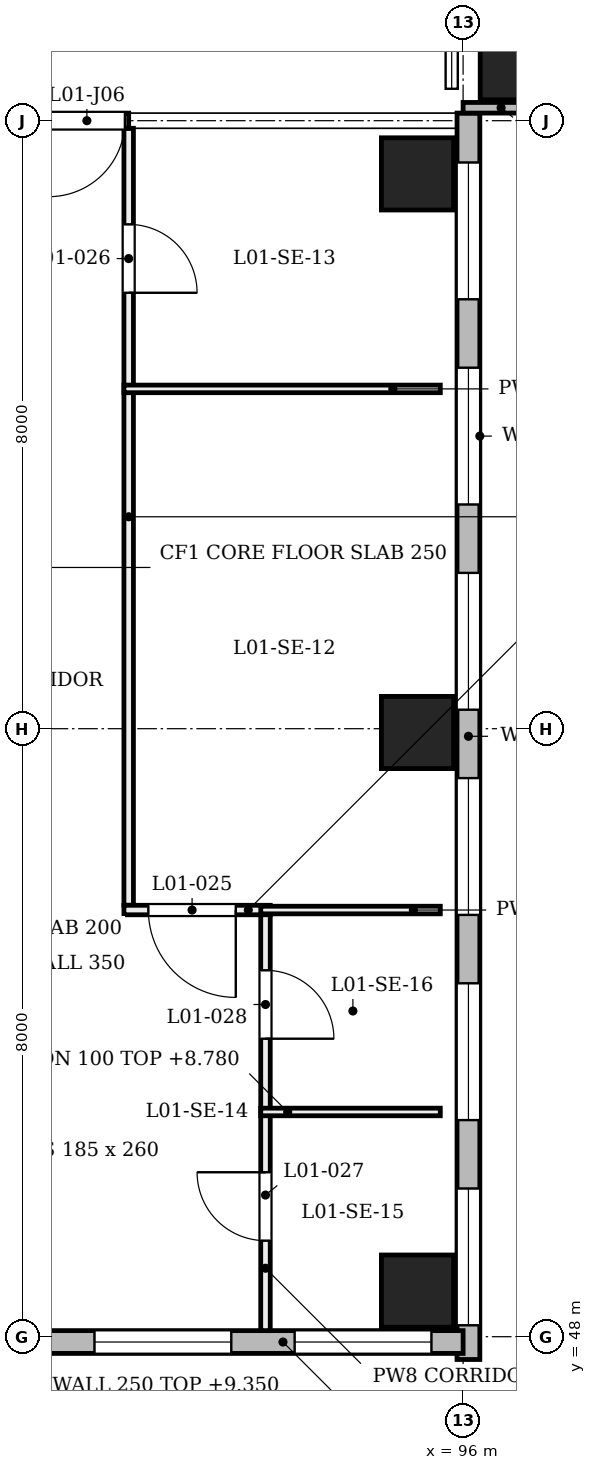
"""IFC4 building model, lengths in metres.
Left out: names, types, materials, properties, quantities, classifications, styles, units other than length and angle.
Written with IfcOpenShell. Run it as: python <this file> out.ifc"""

import sys

from ifc_helpers import new_model, si_unit, direction, frame, frame_2d, origin, origin_2d, place, context, subcontext, project, spatial, rectangle, extrude, element, fill, save


model = new_model("IFC4")
c1 = context("Model", 3, precision=1e-05, world=origin(), true_north=direction((0.0, 1.0)))
c2 = subcontext(c1, "Body", "Model", "MODEL_VIEW")
j1 = project(units=[si_unit("LENGTHUNIT", "METRE"), si_unit("PLANEANGLEUNIT", "RADIAN")], contexts=[c1])
p1 = place(None, origin())
s1 = spatial("IfcSite", under=j1, at=p1, CompositionType="ELEMENT")
p2 = place(p1, origin())
s2 = spatial("IfcBuilding", under=s1, at=p2, CompositionType="ELEMENT")
p3 = place(p2, frame((0.0, 0.0, 4.8)))
s3 = spatial("IfcBuildingStorey", under=s2, at=p3, CompositionType="ELEMENT", Elevation=4.8)
for number, where, z_axis, x_axis in (
    (1, (95.4, 48.6, 0.0), (0.0, 0.0, 1.0), (1.0, 0.0, 0.0)),
    (2, (95.4, 55.95, 0.0), (0.0, 0.0, 1.0), (1.0, 0.0, 0.0)),
    (3, (95.4, 63.3, 0.0), (0.0, 0.0, 1.0), (1.0, 0.0, 0.0)),
):
    element("IfcColumn", number, at=place(p3, frame(where, z_axis=z_axis, x_axis=x_axis)), inside=s3, PredefinedType="COLUMN", context=c2, shape_type="SweptSolid", body=[
        extrude(rectangle(XDim=0.95, YDim=0.95, at=origin_2d()), origin(), (0.0, 0.0, 1.0), 4.8),
    ])
p4 = place(p3, frame((96.4, 64.7, 0.0), z_axis=(0.203952265704, 0.0, 0.978980833987), x_axis=(0.0, 1.0, 0.0)))
e4 = element("IfcColumn", 4, at=p4, inside=s3, PredefinedType="COLUMN", context=c2, shape_type="SweptSolid", body=[
    extrude(rectangle(XDim=0.85, YDim=0.85, at=origin_2d()), origin(), (0.0, 0.0, 1.0), 4.903),
])
p5 = place(p3, frame((96.07, 47.7, 0.0), z_axis=(0.0, 0.0, 1.0), x_axis=(0.0, 1.0, 0.0)))
e5 = element("IfcWall", 5, at=p5, inside=s3, PredefinedType="SOLIDWALL", context=c2, shape_type="SweptSolid", body=[
    extrude(rectangle(XDim=16.4, YDim=0.3, at=frame_2d((8.2, 0.0))), origin(), (0.0, 0.0, 1.0), 3.9),
])
p6 = place(p5, frame((0.45, 0.0, 0.75)))
e6 = element("IfcOpeningElement", 6, at=p6, cuts=e5, PredefinedType="OPENING", context=c2, shape_type="SweptSolid", body=[
    extrude(rectangle(XDim=1.8, YDim=3.1, at=frame_2d((0.9, 1.55))), frame((0.0, 0.16, 0.0), z_axis=(0.0, -1.0, 0.0), x_axis=(1.0, 0.0, 0.0)), (0.0, 0.0, 1.0), 0.32),
])
p7 = place(p5, frame((3.15, 0.0, 0.75)))
e7 = element("IfcOpeningElement", 7, at=p7, cuts=e5, PredefinedType="OPENING", context=c2, shape_type="SweptSolid", body=[
    extrude(rectangle(XDim=1.8, YDim=3.1, at=frame_2d((0.9, 1.55))), frame((0.0, 0.16, 0.0), z_axis=(0.0, -1.0, 0.0), x_axis=(1.0, 0.0, 0.0)), (0.0, 0.0, 1.0), 0.32),
])
p8 = place(p5, frame((5.85, 0.0, 0.75)))
e8 = element("IfcOpeningElement", 8, at=p8, cuts=e5, PredefinedType="OPENING", context=c2, shape_type="SweptSolid", body=[
    extrude(rectangle(XDim=1.8, YDim=3.1, at=frame_2d((0.9, 1.55))), frame((0.0, 0.16, 0.0), z_axis=(0.0, -1.0, 0.0), x_axis=(1.0, 0.0, 0.0)), (0.0, 0.0, 1.0), 0.32),
])
p9 = place(p5, frame((8.55, 0.0, 0.75)))
e9 = element("IfcOpeningElement", 9, at=p9, cuts=e5, PredefinedType="OPENING", context=c2, shape_type="SweptSolid", body=[
    extrude(rectangle(XDim=1.8, YDim=3.1, at=frame_2d((0.9, 1.55))), frame((0.0, 0.16, 0.0), z_axis=(0.0, -1.0, 0.0), x_axis=(1.0, 0.0, 0.0)), (0.0, 0.0, 1.0), 0.32),
])
p10 = place(p5, frame((11.25, 0.0, 0.75)))
e10 = element("IfcOpeningElement", 10, at=p10, cuts=e5, PredefinedType="OPENING", context=c2, shape_type="SweptSolid", body=[
    extrude(rectangle(XDim=1.8, YDim=3.1, at=frame_2d((0.9, 1.55))), frame((0.0, 0.16, 0.0), z_axis=(0.0, -1.0, 0.0), x_axis=(1.0, 0.0, 0.0)), (0.0, 0.0, 1.0), 0.32),
])
p11 = place(p5, frame((13.95, 0.0, 0.75)))
e11 = element("IfcOpeningElement", 11, at=p11, cuts=e5, PredefinedType="OPENING", context=c2, shape_type="SweptSolid", body=[
    extrude(rectangle(XDim=1.8, YDim=3.1, at=frame_2d((0.9, 1.55))), frame((0.0, 0.16, 0.0), z_axis=(0.0, -1.0, 0.0), x_axis=(1.0, 0.0, 0.0)), (0.0, 0.0, 1.0), 0.32),
])
p12 = place(p3, frame((88.1, 47.93, 0.0), z_axis=(0.0, 0.0, 1.0), x_axis=(1.0, 0.0, 0.0)))
e12 = element("IfcWall", 12, at=p12, inside=s3, PredefinedType="SOLIDWALL", context=c2, shape_type="SweptSolid", body=[
    extrude(rectangle(XDim=7.9, YDim=0.3, at=frame_2d((3.95, 0.0))), origin(), (0.0, 0.0, 1.0), 3.9),
])
p13 = place(p12, frame((0.417, 0.0, 0.75)))
e13 = element("IfcOpeningElement", 13, at=p13, cuts=e12, PredefinedType="OPENING", context=c2, shape_type="SweptSolid", body=[
    extrude(rectangle(XDim=1.8, YDim=3.1, at=frame_2d((0.9, 1.55))), frame((0.0, 0.16, 0.0), z_axis=(0.0, -1.0, 0.0), x_axis=(1.0, 0.0, 0.0)), (0.0, 0.0, 1.0), 0.32),
])
p14 = place(p12, frame((3.05, 0.0, 0.75)))
e14 = element("IfcOpeningElement", 14, at=p14, cuts=e12, PredefinedType="OPENING", context=c2, shape_type="SweptSolid", body=[
    extrude(rectangle(XDim=1.8, YDim=3.1, at=frame_2d((0.9, 1.55))), frame((0.0, 0.16, 0.0), z_axis=(0.0, -1.0, 0.0), x_axis=(1.0, 0.0, 0.0)), (0.0, 0.0, 1.0), 0.32),
])
p15 = place(p12, frame((5.683, 0.0, 0.75)))
e15 = element("IfcOpeningElement", 15, at=p15, cuts=e12, PredefinedType="OPENING", context=c2, shape_type="SweptSolid", body=[
    extrude(rectangle(XDim=1.8, YDim=3.1, at=frame_2d((0.9, 1.55))), frame((0.0, 0.16, 0.0), z_axis=(0.0, -1.0, 0.0), x_axis=(1.0, 0.0, 0.0)), (0.0, 0.0, 1.0), 0.32),
])
p16 = place(p3, frame((96.0, 64.17, 0.0), z_axis=(0.0, 0.0, 1.0), x_axis=(1.0, 0.0, 0.0)))
e16 = element("IfcWall", 16, at=p16, inside=s3, PredefinedType="SOLIDWALL", context=c2, shape_type="SweptSolid", body=[
    extrude(rectangle(XDim=1.0, YDim=0.14, at=frame_2d((0.5, 0.0))), origin(), (0.0, 0.0, 1.0), 3.9),
])
p17 = place(p3, frame((91.6, 53.677, 0.0), z_axis=(0.0, 0.0, 1.0), x_axis=(0.0, 1.0, 0.0)))
e17 = element("IfcWall", 17, at=p17, inside=s3, PredefinedType="PARTITIONING", context=c2, shape_type="SweptSolid", body=[
    extrude(rectangle(XDim=10.223, YDim=0.125, at=frame_2d((5.112, 0.0))), origin(), (0.0, 0.0, 1.0), 3.88),
])
p18 = place(p17, frame((8.059, 0.0, 0.0)))
e18 = element("IfcOpeningElement", 18, at=p18, cuts=e17, PredefinedType="OPENING", context=c2, shape_type="SweptSolid", body=[
    extrude(rectangle(XDim=0.9, YDim=2.1, at=frame_2d((0.45, 1.05))), frame((0.0, 0.073, 0.0), z_axis=(0.0, -1.0, 0.0), x_axis=(1.0, 0.0, 0.0)), (0.0, 0.0, 1.0), 0.145),
])
p19 = place(p3, frame((91.538, 53.614, 0.0), z_axis=(0.0, 0.0, 1.0), x_axis=(1.0, 0.0, 0.0)))
e19 = element("IfcWall", 19, at=p19, inside=s3, PredefinedType="PARTITIONING", context=c2, shape_type="SweptSolid", body=[
    extrude(rectangle(XDim=1.925, YDim=0.125, at=frame_2d((0.962, 0.0))), origin(), (0.0, 0.0, 1.0), 4.56),
])
p20 = place(p19, frame((0.322, 0.0, 0.0)))
e20 = element("IfcOpeningElement", 20, at=p20, cuts=e19, PredefinedType="OPENING", context=c2, shape_type="SweptSolid", body=[
    extrude(rectangle(XDim=1.15, YDim=2.1, at=frame_2d((0.575, 1.05))), frame((0.0, 0.073, 0.0), z_axis=(0.0, -1.0, 0.0), x_axis=(1.0, 0.0, 0.0)), (0.0, 0.0, 1.0), 0.145),
])
p21 = place(p3, frame((93.337, 53.614, 0.0), z_axis=(0.0, 0.0, 1.0), x_axis=(1.0, 0.0, 0.0)))
e21 = element("IfcWall", 21, at=p21, inside=s3, PredefinedType="PARTITIONING", context=c2, shape_type="SweptSolid", body=[
    extrude(rectangle(XDim=2.363, YDim=0.1, at=frame_2d((1.181, 0.0))), origin(), (0.0, 0.0, 1.0), 3.98),
])
p22 = place(p3, frame((91.538, 60.471, 0.0), z_axis=(0.0, 0.0, 1.0), x_axis=(1.0, 0.0, 0.0)))
e22 = element("IfcWall", 22, at=p22, inside=s3, PredefinedType="PARTITIONING", context=c2, shape_type="SweptSolid", body=[
    extrude(rectangle(XDim=4.162, YDim=0.1, at=frame_2d((2.081, 0.0))), origin(), (0.0, 0.0, 1.0), 3.98),
])
p23 = place(p3, frame((93.4, 48.08, 0.0), z_axis=(0.0, 0.0, 1.0), x_axis=(0.0, 1.0, 0.0)))
e23 = element("IfcWall", 23, at=p23, inside=s3, PredefinedType="PARTITIONING", context=c2, shape_type="SweptSolid", body=[
    extrude(rectangle(XDim=5.472, YDim=0.125, at=frame_2d((2.736, 0.0))), origin(), (0.0, 0.0, 1.0), 3.88),
])
p24 = place(p23, frame((1.184, 0.0, 0.0)))
e24 = element("IfcOpeningElement", 24, at=p24, cuts=e23, PredefinedType="OPENING", context=c2, shape_type="SweptSolid", body=[
    extrude(rectangle(XDim=0.9, YDim=2.1, at=frame_2d((0.45, 1.05))), frame((0.0, 0.073, 0.0), z_axis=(0.0, -1.0, 0.0), x_axis=(1.0, 0.0, 0.0)), (0.0, 0.0, 1.0), 0.145),
])
p25 = place(p23, frame((3.841, 0.0, 0.0)))
e25 = element("IfcOpeningElement", 25, at=p25, cuts=e23, PredefinedType="OPENING", context=c2, shape_type="SweptSolid", body=[
    extrude(rectangle(XDim=0.9, YDim=2.1, at=frame_2d((0.45, 1.05))), frame((0.0, 0.073, 0.0), z_axis=(0.0, -1.0, 0.0), x_axis=(1.0, 0.0, 0.0)), (0.0, 0.0, 1.0), 0.145),
])
p26 = place(p3, frame((93.337, 50.957, 0.0), z_axis=(0.0, 0.0, 1.0), x_axis=(1.0, 0.0, 0.0)))
e26 = element("IfcWall", 26, at=p26, inside=s3, PredefinedType="PARTITIONING", context=c2, shape_type="SweptSolid", body=[
    extrude(rectangle(XDim=2.363, YDim=0.1, at=frame_2d((1.181, 0.0))), origin(), (0.0, 0.0, 1.0), 3.98),
])
p27 = place(p3, frame((88.0, 64.0, 0.0), z_axis=(0.0, 0.0, 1.0), x_axis=(1.0, 0.0, 0.0)))
e27 = element("IfcWall", 27, at=p27, inside=s3, PredefinedType="PARTITIONING", context=c2, shape_type="SweptSolid", body=[
    extrude(rectangle(XDim=3.6, YDim=0.2, at=frame_2d((1.8, 0.0))), origin(), (0.0, 0.0, 1.0), 3.88),
])
p28 = place(p27, frame((2.55, 0.0, 0.0)))
e28 = element("IfcOpeningElement", 28, at=p28, cuts=e27, PredefinedType="OPENING", context=c2, shape_type="SweptSolid", body=[
    extrude(rectangle(XDim=1.0, YDim=2.1, at=frame_2d((0.5, 1.05))), frame((0.0, 0.11, 0.0), z_axis=(0.0, -1.0, 0.0), x_axis=(1.0, 0.0, 0.0)), (0.0, 0.0, 1.0), 0.22),
])
p29 = place(p6, origin())
e29 = element("IfcWindow", 29, at=p29, inside=s3, PartitioningType="SINGLE_PANEL", PredefinedType="WINDOW", context=c2, shape_type="SweptSolid", body=[
    extrude(rectangle(XDim=1.8, YDim=3.1, at=frame_2d((0.9, 1.55))), frame((0.0, 0.03, 0.0), z_axis=(0.0, -1.0, 0.0), x_axis=(1.0, 0.0, 0.0)), (0.0, 0.0, 1.0), 0.06),
])
fill(e6, e29)
p30 = place(p7, origin())
e30 = element("IfcWindow", 30, at=p30, inside=s3, PartitioningType="SINGLE_PANEL", PredefinedType="WINDOW", context=c2, shape_type="SweptSolid", body=[
    extrude(rectangle(XDim=1.8, YDim=3.1, at=frame_2d((0.9, 1.55))), frame((0.0, 0.03, 0.0), z_axis=(0.0, -1.0, 0.0), x_axis=(1.0, 0.0, 0.0)), (0.0, 0.0, 1.0), 0.06),
])
fill(e7, e30)
p31 = place(p8, origin())
e31 = element("IfcWindow", 31, at=p31, inside=s3, PartitioningType="SINGLE_PANEL", PredefinedType="WINDOW", context=c2, shape_type="SweptSolid", body=[
    extrude(rectangle(XDim=1.8, YDim=3.1, at=frame_2d((0.9, 1.55))), frame((0.0, 0.03, 0.0), z_axis=(0.0, -1.0, 0.0), x_axis=(1.0, 0.0, 0.0)), (0.0, 0.0, 1.0), 0.06),
])
fill(e8, e31)
p32 = place(p9, origin())
e32 = element("IfcWindow", 32, at=p32, inside=s3, PartitioningType="SINGLE_PANEL", PredefinedType="WINDOW", context=c2, shape_type="SweptSolid", body=[
    extrude(rectangle(XDim=1.8, YDim=3.1, at=frame_2d((0.9, 1.55))), frame((0.0, 0.03, 0.0), z_axis=(0.0, -1.0, 0.0), x_axis=(1.0, 0.0, 0.0)), (0.0, 0.0, 1.0), 0.06),
])
fill(e9, e32)
p33 = place(p10, origin())
e33 = element("IfcWindow", 33, at=p33, inside=s3, PartitioningType="SINGLE_PANEL", PredefinedType="WINDOW", context=c2, shape_type="SweptSolid", body=[
    extrude(rectangle(XDim=1.8, YDim=3.1, at=frame_2d((0.9, 1.55))), frame((0.0, 0.03, 0.0), z_axis=(0.0, -1.0, 0.0), x_axis=(1.0, 0.0, 0.0)), (0.0, 0.0, 1.0), 0.06),
])
fill(e10, e33)
p34 = place(p11, origin())
e34 = element("IfcWindow", 34, at=p34, inside=s3, PartitioningType="SINGLE_PANEL", PredefinedType="WINDOW", context=c2, shape_type="SweptSolid", body=[
    extrude(rectangle(XDim=1.8, YDim=3.1, at=frame_2d((0.9, 1.55))), frame((0.0, 0.03, 0.0), z_axis=(0.0, -1.0, 0.0), x_axis=(1.0, 0.0, 0.0)), (0.0, 0.0, 1.0), 0.06),
])
fill(e11, e34)
p35 = place(p14, origin())
e35 = element("IfcWindow", 35, at=p35, inside=s3, PartitioningType="SINGLE_PANEL", PredefinedType="WINDOW", context=c2, shape_type="SweptSolid", body=[
    extrude(rectangle(XDim=1.8, YDim=3.1, at=frame_2d((0.9, 1.55))), frame((0.0, 0.03, 0.0), z_axis=(0.0, -1.0, 0.0), x_axis=(1.0, 0.0, 0.0)), (0.0, 0.0, 1.0), 0.06),
])
fill(e14, e35)
p36 = place(p15, origin())
e36 = element("IfcWindow", 36, at=p36, inside=s3, PartitioningType="SINGLE_PANEL", PredefinedType="WINDOW", context=c2, shape_type="SweptSolid", body=[
    extrude(rectangle(XDim=1.8, YDim=3.1, at=frame_2d((0.9, 1.55))), frame((0.0, 0.03, 0.0), z_axis=(0.0, -1.0, 0.0), x_axis=(1.0, 0.0, 0.0)), (0.0, 0.0, 1.0), 0.06),
])
fill(e15, e36)
p37 = place(p20, origin())
e37 = element("IfcDoor", 37, at=p37, inside=s3, OperationType="SINGLE_SWING_RIGHT", PredefinedType="DOOR", context=c2, shape_type="SweptSolid", body=[
    extrude(rectangle(XDim=1.15, YDim=2.1, at=frame_2d((0.575, 1.05))), frame((0.0, 0.025, 0.0), z_axis=(0.0, -1.0, 0.0), x_axis=(1.0, 0.0, 0.0)), (0.0, 0.0, 1.0), 0.05),
])
fill(e20, e37)
p38 = place(p18, frame((0.9, 0.0, 0.0), z_axis=(0.0, 0.0, 1.0), x_axis=(-1.0, 0.0, 0.0)))
e38 = element("IfcDoor", 38, at=p38, inside=s3, OperationType="SINGLE_SWING_LEFT", PredefinedType="DOOR", context=c2, shape_type="SweptSolid", body=[
    extrude(rectangle(XDim=0.9, YDim=2.1, at=frame_2d((0.45, 1.05))), frame((0.0, 0.025, 0.0), z_axis=(0.0, -1.0, 0.0), x_axis=(1.0, 0.0, 0.0)), (0.0, 0.0, 1.0), 0.05),
])
fill(e18, e38)
p39 = place(p24, frame((0.9, 0.0, 0.0), z_axis=(0.0, 0.0, 1.0), x_axis=(-1.0, 0.0, 0.0)))
e39 = element("IfcDoor", 39, at=p39, inside=s3, OperationType="SINGLE_SWING_RIGHT", PredefinedType="DOOR", context=c2, shape_type="SweptSolid", body=[
    extrude(rectangle(XDim=0.9, YDim=2.1, at=frame_2d((0.45, 1.05))), frame((0.0, 0.025, 0.0), z_axis=(0.0, -1.0, 0.0), x_axis=(1.0, 0.0, 0.0)), (0.0, 0.0, 1.0), 0.05),
])
fill(e24, e39)
p40 = place(p25, frame((0.9, 0.0, 0.0), z_axis=(0.0, 0.0, 1.0), x_axis=(-1.0, 0.0, 0.0)))
e40 = element("IfcDoor", 40, at=p40, inside=s3, OperationType="SINGLE_SWING_LEFT", PredefinedType="DOOR", context=c2, shape_type="SweptSolid", body=[
    extrude(rectangle(XDim=0.9, YDim=2.1, at=frame_2d((0.45, 1.05))), frame((0.0, 0.025, 0.0), z_axis=(0.0, -1.0, 0.0), x_axis=(1.0, 0.0, 0.0)), (0.0, 0.0, 1.0), 0.05),
])
fill(e25, e40)
p41 = place(p28, frame((1.0, 0.0, 0.0), z_axis=(0.0, 0.0, 1.0), x_axis=(-1.0, 0.0, 0.0)))
e41 = element("IfcDoor", 41, at=p41, inside=s3, OperationType="SINGLE_SWING_LEFT", PredefinedType="DOOR", context=c2, shape_type="SweptSolid", body=[
    extrude(rectangle(XDim=1.0, YDim=2.1, at=frame_2d((0.5, 1.05))), frame((0.0, 0.025, 0.0), z_axis=(0.0, -1.0, 0.0), x_axis=(1.0, 0.0, 0.0)), (0.0, 0.0, 1.0), 0.05),
])
fill(e28, e41)
save(model, sys.argv[1])
